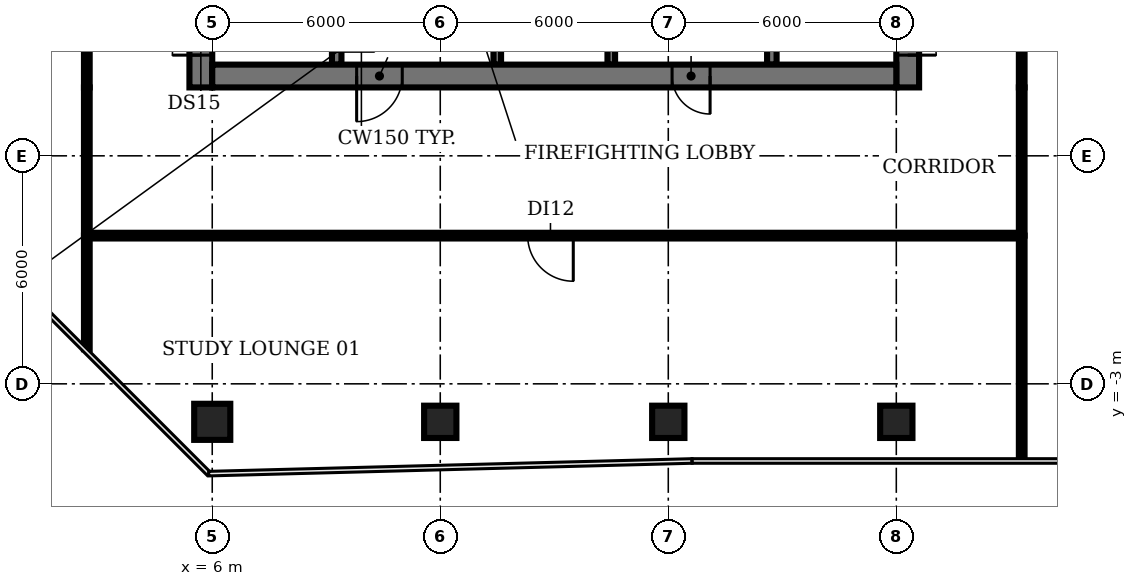
"""IFC4 building model, lengths in metres.
Left out: names, types, materials, properties, quantities, classifications, styles, units other than length and angle.
Written with IfcOpenShell. Run it as: python <this file> out.ifc"""

import sys

from ifc_helpers import new_model, si_unit, direction, frame, frame_2d, origin, origin_2d, place, context, subcontext, project, spatial, rectangle, circle, extrude, element, fill, save


model = new_model("IFC4")
c1 = context("Model", 3, precision=1e-05, world=origin(), true_north=direction((0.0, 1.0)))
c2 = subcontext(c1, "Body", "Model", "MODEL_VIEW")
j1 = project(units=[si_unit("LENGTHUNIT", "METRE"), si_unit("PLANEANGLEUNIT", "RADIAN")], contexts=[c1])
p1 = place(None, origin())
s1 = spatial("IfcSite", under=j1, at=p1, CompositionType="ELEMENT")
p2 = place(p1, origin())
s2 = spatial("IfcBuilding", under=s1, at=p2, CompositionType="ELEMENT")
p3 = place(p2, frame((0.0, 0.0, 176.0)))
s3 = spatial("IfcBuildingStorey", under=s2, at=p3, CompositionType="ELEMENT", Elevation=176.0)
p4 = place(p3, frame((6.0, -4.0, 0.0), z_axis=(0.0, 0.0, 1.0), x_axis=(1.0, 0.0, 0.0)))
e1 = element("IfcColumn", 1, at=p4, inside=s3, PredefinedType="COLUMN", context=c2, shape_type="SweptSolid", body=[
    extrude(circle(Radius=0.475, at=origin_2d()), origin(), (0.0, 0.0, 1.0), 3.85),
])
for number, where, z_axis, x_axis in (
    (2, (12.0, -4.0, 0.0), (0.0, 0.0, 1.0), (1.0, 0.0, 0.0)),
    (3, (18.0, -4.0, 0.0), (0.0, 0.0, 1.0), (1.0, 0.0, 0.0)),
    (4, (24.0, -4.0, 0.0), (0.0, 0.0, 1.0), (1.0, 0.0, 0.0)),
):
    element("IfcColumn", number, at=place(p3, frame(where, z_axis=z_axis, x_axis=x_axis)), inside=s3, PredefinedType="COLUMN", context=c2, shape_type="SweptSolid", body=[
        extrude(rectangle(XDim=0.85, YDim=0.85, at=origin_2d()), origin(), (0.0, 0.0, 1.0), 3.85),
    ])
p5 = place(p3, frame((9.275, 11.825, 0.0), z_axis=(0.0, 0.0, 1.0), x_axis=(0.0, -1.0, 0.0)))
e5 = element("IfcWall", 5, at=p5, inside=s3, PredefinedType="SHEAR", context=c2, shape_type="SweptSolid", body=[
    extrude(rectangle(XDim=6.425, YDim=0.25, at=frame_2d((3.212, 0.0))), origin(), (0.0, 0.0, 1.0), 3.85),
])
p6 = place(p5, frame((5.075, 0.0, 0.0)))
e6 = element("IfcOpeningElement", 6, at=p6, cuts=e5, PredefinedType="OPENING", context=c2, shape_type="SweptSolid", body=[
    extrude(rectangle(XDim=1.0, YDim=2.1, at=frame_2d((0.5, 1.05))), frame((0.0, 0.135, 0.0), z_axis=(0.0, -1.0, 0.0), x_axis=(1.0, 0.0, 0.0)), (0.0, 0.0, 1.0), 0.27),
])
p7 = place(p3, frame((13.5, 5.4, 0.0), z_axis=(0.0, 0.0, 1.0), x_axis=(0.0, 1.0, 0.0)))
e7 = element("IfcWall", 7, at=p7, inside=s3, PredefinedType="SHEAR", context=c2, shape_type="SweptSolid", body=[
    extrude(rectangle(XDim=8.2, YDim=0.2, at=frame_2d((4.1, 0.0))), origin(), (0.0, 0.0, 1.0), 3.85),
])
p8 = place(p7, frame((0.75, 0.0, 0.0)))
e8 = element("IfcOpeningElement", 8, at=p8, cuts=e7, PredefinedType="OPENING", context=c2, shape_type="SweptSolid", body=[
    extrude(rectangle(XDim=1.1, YDim=2.1, at=frame_2d((0.55, 1.05))), frame((0.0, 0.11, 0.0), z_axis=(0.0, -1.0, 0.0), x_axis=(1.0, 0.0, 0.0)), (0.0, 0.0, 1.0), 0.22),
])
p9 = place(p7, frame((3.55, 0.0, 0.0)))
e9 = element("IfcOpeningElement", 9, at=p9, cuts=e7, PredefinedType="OPENING", context=c2, shape_type="SweptSolid", body=[
    extrude(rectangle(XDim=1.1, YDim=2.1, at=frame_2d((0.55, 1.05))), frame((0.0, 0.11, 0.0), z_axis=(0.0, -1.0, 0.0), x_axis=(1.0, 0.0, 0.0)), (0.0, 0.0, 1.0), 0.22),
])
p10 = place(p7, frame((6.35, 0.0, 0.0)))
e10 = element("IfcOpeningElement", 10, at=p10, cuts=e7, PredefinedType="OPENING", context=c2, shape_type="SweptSolid", body=[
    extrude(rectangle(XDim=1.1, YDim=2.1, at=frame_2d((0.55, 1.05))), frame((0.0, 0.11, 0.0), z_axis=(0.0, -1.0, 0.0), x_axis=(1.0, 0.0, 0.0)), (0.0, 0.0, 1.0), 0.22),
])
p11 = place(p3, frame((16.5, 5.4, 0.0), z_axis=(0.0, 0.0, 1.0), x_axis=(0.0, 1.0, 0.0)))
e11 = element("IfcWall", 11, at=p11, inside=s3, PredefinedType="SHEAR", context=c2, shape_type="SweptSolid", body=[
    extrude(rectangle(XDim=8.2, YDim=0.2, at=frame_2d((4.1, 0.0))), origin(), (0.0, 0.0, 1.0), 3.85),
])
p12 = place(p3, frame((20.725, 5.4, 0.0), z_axis=(0.0, 0.0, 1.0), x_axis=(0.0, 1.0, 0.0)))
e12 = element("IfcWall", 12, at=p12, inside=s3, PredefinedType="SHEAR", context=c2, shape_type="SweptSolid", body=[
    extrude(rectangle(XDim=8.2, YDim=0.25, at=frame_2d((4.1, 0.0))), origin(), (0.0, 0.0, 1.0), 3.85),
])
p13 = place(p3, frame((5.7, 4.8, 0.0), z_axis=(0.0, 0.0, 1.0), x_axis=(0.0, 1.0, 0.0)))
e13 = element("IfcWall", 13, at=p13, inside=s3, PredefinedType="SHEAR", context=c2, shape_type="SweptSolid", body=[
    extrude(rectangle(XDim=20.6, YDim=0.6, at=frame_2d((10.3, 0.0))), origin(), (0.0, 0.0, 1.0), 3.85),
])
p14 = place(p13, frame((0.85, 0.0, 0.0)))
e14 = element("IfcOpeningElement", 14, at=p14, cuts=e13, PredefinedType="OPENING", context=c2, shape_type="SweptSolid", body=[
    extrude(rectangle(XDim=1.5, YDim=2.1, at=frame_2d((0.75, 1.05))), frame((0.0, 0.31, 0.0), z_axis=(0.0, -1.0, 0.0), x_axis=(1.0, 0.0, 0.0)), (0.0, 0.0, 1.0), 0.62),
])
p15 = place(p13, frame((7.3, 0.0, 0.0)))
e15 = element("IfcOpeningElement", 15, at=p15, cuts=e13, PredefinedType="OPENING", context=c2, shape_type="SweptSolid", body=[
    extrude(rectangle(XDim=1.2, YDim=2.1, at=frame_2d((0.6, 1.05))), frame((0.0, 0.31, 0.0), z_axis=(0.0, -1.0, 0.0), x_axis=(1.0, 0.0, 0.0)), (0.0, 0.0, 1.0), 0.62),
])
p16 = place(p13, frame((13.85, 0.0, 0.0)))
e16 = element("IfcOpeningElement", 16, at=p16, cuts=e13, PredefinedType="OPENING", context=c2, shape_type="SweptSolid", body=[
    extrude(rectangle(XDim=1.2, YDim=2.1, at=frame_2d((0.6, 1.05))), frame((0.0, 0.31, 0.0), z_axis=(0.0, -1.0, 0.0), x_axis=(1.0, 0.0, 0.0)), (0.0, 0.0, 1.0), 0.62),
])
p17 = place(p3, frame((24.3, 25.555, 0.0), z_axis=(0.0, 0.0, 1.0), x_axis=(0.0, -1.0, 0.0)))
e17 = element("IfcWall", 17, at=p17, inside=s3, PredefinedType="SHEAR", context=c2, shape_type="SweptSolid", body=[
    extrude(rectangle(XDim=20.755, YDim=0.6, at=frame_2d((10.377, 0.0))), origin(), (0.0, 0.0, 1.0), 3.85),
])
p18 = place(p17, frame((18.405, 0.0, 0.0)))
e18 = element("IfcOpeningElement", 18, at=p18, cuts=e17, PredefinedType="OPENING", context=c2, shape_type="SweptSolid", body=[
    extrude(rectangle(XDim=1.5, YDim=2.1, at=frame_2d((0.75, 1.05))), frame((0.0, 0.31, 0.0), z_axis=(0.0, -1.0, 0.0), x_axis=(1.0, 0.0, 0.0)), (0.0, 0.0, 1.0), 0.62),
])
p19 = place(p17, frame((12.305, 0.0, 0.0)))
e19 = element("IfcOpeningElement", 19, at=p19, cuts=e17, PredefinedType="OPENING", context=c2, shape_type="SweptSolid", body=[
    extrude(rectangle(XDim=0.9, YDim=2.1, at=frame_2d((0.45, 1.05))), frame((0.0, 0.31, 0.0), z_axis=(0.0, -1.0, 0.0), x_axis=(1.0, 0.0, 0.0)), (0.0, 0.0, 1.0), 0.62),
])
p20 = place(p17, frame((6.305, 0.0, 0.0)))
e20 = element("IfcOpeningElement", 20, at=p20, cuts=e17, PredefinedType="OPENING", context=c2, shape_type="SweptSolid", body=[
    extrude(rectangle(XDim=2.0, YDim=2.1, at=frame_2d((1.0, 1.05))), frame((0.0, 0.31, 0.0), z_axis=(0.0, -1.0, 0.0), x_axis=(1.0, 0.0, 0.0)), (0.0, 0.0, 1.0), 0.62),
])
p21 = place(p3, frame((24.0, 5.1, 0.0), z_axis=(0.0, 0.0, 1.0), x_axis=(-1.0, 0.0, 0.0)))
e21 = element("IfcWall", 21, at=p21, inside=s3, PredefinedType="SHEAR", context=c2, shape_type="SweptSolid", body=[
    extrude(rectangle(XDim=18.0, YDim=0.6, at=frame_2d((9.0, 0.0))), origin(), (0.0, 0.0, 1.0), 3.85),
])
p22 = place(p21, frame((13.0, 0.0, 0.0)))
e22 = element("IfcOpeningElement", 22, at=p22, cuts=e21, PredefinedType="OPENING", context=c2, shape_type="SweptSolid", body=[
    extrude(rectangle(XDim=1.2, YDim=2.1, at=frame_2d((0.6, 1.05))), frame((0.0, 0.31, 0.0), z_axis=(0.0, -1.0, 0.0), x_axis=(1.0, 0.0, 0.0)), (0.0, 0.0, 1.0), 0.62),
])
p23 = place(p21, frame((4.9, 0.0, 0.0)))
e23 = element("IfcOpeningElement", 23, at=p23, cuts=e21, PredefinedType="OPENING", context=c2, shape_type="SweptSolid", body=[
    extrude(rectangle(XDim=1.0, YDim=2.1, at=frame_2d((0.5, 1.05))), frame((0.0, 0.31, 0.0), z_axis=(0.0, -1.0, 0.0), x_axis=(1.0, 0.0, 0.0)), (0.0, 0.0, 1.0), 0.62),
])
p24 = place(p3, frame((2.7, -2.09, 0.0), z_axis=(0.0, 0.0, 1.0), x_axis=(0.0, 1.0, 0.0)))
e24 = element("IfcWall", 24, at=p24, inside=s3, PredefinedType="PARTITIONING", context=c2, shape_type="SweptSolid", body=[
    extrude(rectangle(XDim=2.99, YDim=0.15, at=frame_2d((1.495, 0.0))), origin(), (0.0, 0.0, 1.0), 2.88),
])
p25 = place(p3, frame((2.7, 0.9, 0.0), z_axis=(0.0, 0.0, 1.0), x_axis=(0.0, 1.0, 0.0)))
e25 = element("IfcWall", 25, at=p25, inside=s3, PredefinedType="PARTITIONING", context=c2, shape_type="SweptSolid", body=[
    extrude(rectangle(XDim=3.9, YDim=0.15, at=frame_2d((1.95, 0.0))), origin(), (0.0, 0.0, 1.0), 2.88),
])
p26 = place(p3, frame((2.7, 4.8, 0.0), z_axis=(0.0, 0.0, 1.0), x_axis=(0.0, 1.0, 0.0)))
e26 = element("IfcWall", 26, at=p26, inside=s3, PredefinedType="PARTITIONING", context=c2, shape_type="SweptSolid", body=[
    extrude(rectangle(XDim=20.6, YDim=0.15, at=frame_2d((10.3, 0.0))), origin(), (0.0, 0.0, 1.0), 2.88),
])
p27 = place(p26, frame((10.2, 0.0, 0.0)))
e27 = element("IfcOpeningElement", 27, at=p27, cuts=e26, PredefinedType="OPENING", context=c2, shape_type="SweptSolid", body=[
    extrude(rectangle(XDim=1.2, YDim=2.1, at=frame_2d((0.6, 1.05))), frame((0.0, 0.085, 0.0), z_axis=(0.0, -1.0, 0.0), x_axis=(1.0, 0.0, 0.0)), (0.0, 0.0, 1.0), 0.17),
])
p28 = place(p3, frame((27.3, -4.98, 0.0), z_axis=(0.0, 0.0, 1.0), x_axis=(0.0, 1.0, 0.0)))
e28 = element("IfcWall", 28, at=p28, inside=s3, PredefinedType="PARTITIONING", context=c2, shape_type="SweptSolid", body=[
    extrude(rectangle(XDim=5.88, YDim=0.15, at=frame_2d((2.94, 0.0))), origin(), (0.0, 0.0, 1.0), 2.88),
])
p29 = place(p3, frame((27.3, 0.9, 0.0), z_axis=(0.0, 0.0, 1.0), x_axis=(-1.0, 0.0, 0.0)))
e29 = element("IfcWall", 29, at=p29, inside=s3, PredefinedType="PARTITIONING", context=c2, shape_type="SweptSolid", body=[
    extrude(rectangle(XDim=24.6, YDim=0.15, at=frame_2d((12.3, 0.0))), origin(), (0.0, 0.0, 1.0), 2.88),
])
p30 = place(p29, frame((11.8, 0.0, 0.0)))
e30 = element("IfcOpeningElement", 30, at=p30, cuts=e29, PredefinedType="OPENING", context=c2, shape_type="SweptSolid", body=[
    extrude(rectangle(XDim=1.2, YDim=2.1, at=frame_2d((0.6, 1.05))), frame((0.0, 0.085, 0.0), z_axis=(0.0, -1.0, 0.0), x_axis=(1.0, 0.0, 0.0)), (0.0, 0.0, 1.0), 0.17),
])
p31 = place(p3, frame((27.3, 0.9, 0.0), z_axis=(0.0, 0.0, 1.0), x_axis=(0.0, 1.0, 0.0)))
e31 = element("IfcWall", 31, at=p31, inside=s3, PredefinedType="PARTITIONING", context=c2, shape_type="SweptSolid", body=[
    extrude(rectangle(XDim=3.9, YDim=0.15, at=frame_2d((1.95, 0.0))), origin(), (0.0, 0.0, 1.0), 2.88),
])
p32 = place(p3, frame((27.3, 4.8, 0.0), z_axis=(0.0, 0.0, 1.0), x_axis=(0.0, 1.0, 0.0)))
e32 = element("IfcWall", 32, at=p32, inside=s3, PredefinedType="PARTITIONING", context=c2, shape_type="SweptSolid", body=[
    extrude(rectangle(XDim=10.0, YDim=0.15, at=frame_2d((5.0, 0.0))), origin(), (0.0, 0.0, 1.0), 2.88),
])
p33 = place(p32, frame((4.4, 0.0, 0.0)))
e33 = element("IfcOpeningElement", 33, at=p33, cuts=e32, PredefinedType="OPENING", context=c2, shape_type="SweptSolid", body=[
    extrude(rectangle(XDim=1.2, YDim=2.1, at=frame_2d((0.6, 1.05))), frame((0.0, 0.085, 0.0), z_axis=(0.0, -1.0, 0.0), x_axis=(1.0, 0.0, 0.0)), (0.0, 0.0, 1.0), 0.17),
])
p34 = place(p14, origin())
e34 = element("IfcDoor", 34, at=p34, inside=s3, OperationType="DOUBLE_DOOR_SINGLE_SWING", PredefinedType="DOOR", context=c2, shape_type="SweptSolid", body=[
    extrude(rectangle(XDim=1.5, YDim=2.1, at=frame_2d((0.75, 1.05))), frame((0.0, 0.025, 0.0), z_axis=(0.0, -1.0, 0.0), x_axis=(1.0, 0.0, 0.0)), (0.0, 0.0, 1.0), 0.05),
])
fill(e14, e34)
p35 = place(p18, origin())
e35 = element("IfcDoor", 35, at=p35, inside=s3, OperationType="DOUBLE_DOOR_SINGLE_SWING", PredefinedType="DOOR", context=c2, shape_type="SweptSolid", body=[
    extrude(rectangle(XDim=1.5, YDim=2.1, at=frame_2d((0.75, 1.05))), frame((0.0, 0.025, 0.0), z_axis=(0.0, -1.0, 0.0), x_axis=(1.0, 0.0, 0.0)), (0.0, 0.0, 1.0), 0.05),
])
fill(e18, e35)
p36 = place(p22, origin())
e36 = element("IfcDoor", 36, at=p36, inside=s3, OperationType="SINGLE_SWING_RIGHT", PredefinedType="DOOR", context=c2, shape_type="SweptSolid", body=[
    extrude(rectangle(XDim=1.2, YDim=2.1, at=frame_2d((0.6, 1.05))), frame((0.0, 0.025, 0.0), z_axis=(0.0, -1.0, 0.0), x_axis=(1.0, 0.0, 0.0)), (0.0, 0.0, 1.0), 0.05),
])
fill(e22, e36)
p37 = place(p23, origin())
e37 = element("IfcDoor", 37, at=p37, inside=s3, OperationType="SINGLE_SWING_LEFT", PredefinedType="DOOR", context=c2, shape_type="SweptSolid", body=[
    extrude(rectangle(XDim=1.0, YDim=2.1, at=frame_2d((0.5, 1.05))), frame((0.0, -0.24, 0.0), z_axis=(0.0, -1.0, 0.0), x_axis=(1.0, 0.0, 0.0)), (0.0, 0.0, 1.0), 0.05),
])
fill(e23, e37)
p38 = place(p30, origin())
e38 = element("IfcDoor", 38, at=p38, inside=s3, OperationType="SINGLE_SWING_LEFT", PredefinedType="DOOR", context=c2, shape_type="SweptSolid", body=[
    extrude(rectangle(XDim=1.2, YDim=2.1, at=frame_2d((0.6, 1.05))), frame((0.0, 0.025, 0.0), z_axis=(0.0, -1.0, 0.0), x_axis=(1.0, 0.0, 0.0)), (0.0, 0.0, 1.0), 0.05),
])
fill(e30, e38)
save(model, sys.argv[1])
